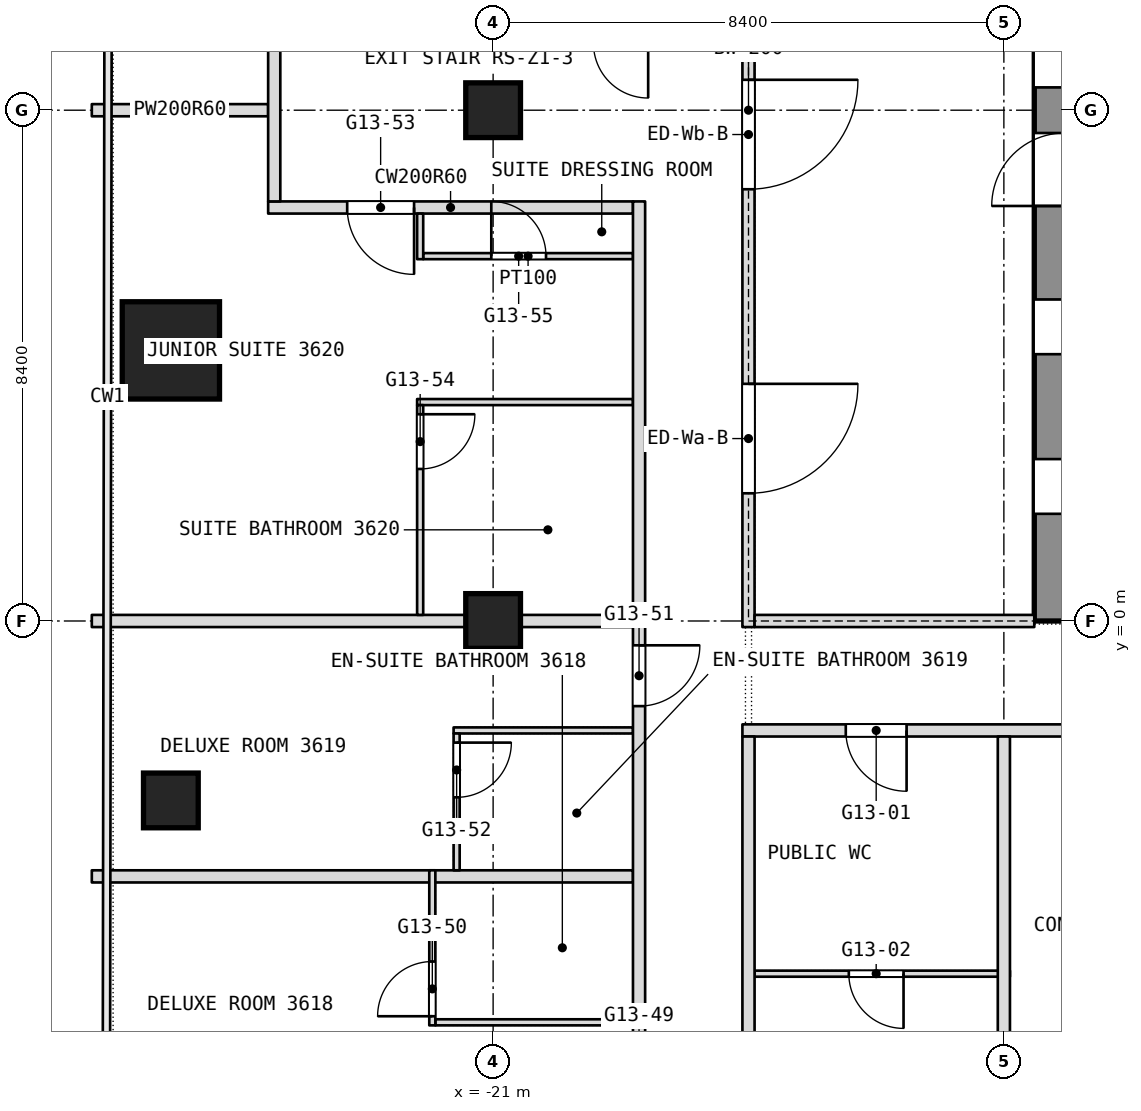
"""IFC4 building model, lengths in metres.
Left out: names, types, materials, properties, quantities, classifications, styles, units other than length and angle.
Written with IfcOpenShell. Run it as: python <this file> out.ifc"""

import sys

from ifc_helpers import new_model, si_unit, direction, frame, frame_2d, origin, origin_2d, place, context, subcontext, project, spatial, rectangle, extrude, element, fill, save


model = new_model("IFC4")
c1 = context("Model", 3, precision=1e-05, world=origin(), true_north=direction((0.0, 1.0)))
c2 = subcontext(c1, "Body", "Model", "MODEL_VIEW")
j1 = project(units=[si_unit("LENGTHUNIT", "METRE"), si_unit("PLANEANGLEUNIT", "RADIAN")], contexts=[c1])
p1 = place(None, origin())
s1 = spatial("IfcSite", under=j1, at=p1, CompositionType="ELEMENT")
p2 = place(p1, origin())
s2 = spatial("IfcBuilding", under=s1, at=p2, CompositionType="ELEMENT")
p3 = place(p2, frame((0.0, 0.0, 155.3)))
s3 = spatial("IfcBuildingStorey", under=s2, at=p3, CompositionType="ELEMENT", Elevation=155.3)
p4 = place(p3, frame((-11.6, 0.0, 0.0), z_axis=(0.0, 0.0, 1.0), x_axis=(0.0, 1.0, 0.0)))
e1 = element("IfcWall", 1, at=p4, inside=s3, PredefinedType="SHEAR", context=c2, shape_type="SweptSolid", body=[
    extrude(rectangle(XDim=16.8, YDim=1.0, at=frame_2d((8.4, 0.0))), origin(), (0.0, 0.0, 1.0), 3.6),
])
p5 = place(p4, frame((1.762, 0.0, 0.0)))
e2 = element("IfcOpeningElement", 2, at=p5, cuts=e1, PredefinedType="OPENING", context=c2, shape_type="SweptSolid", body=[
    extrude(rectangle(XDim=0.9, YDim=2.1, at=frame_2d((0.45, 1.05))), frame((0.0, 0.5, 0.0), z_axis=(0.0, -1.0, 0.0), x_axis=(1.0, 0.0, 0.0)), (0.0, 0.0, 1.0), 1.0),
])
p6 = place(p4, frame((4.387, 0.0, 0.0)))
e3 = element("IfcOpeningElement", 3, at=p6, cuts=e1, PredefinedType="OPENING", context=c2, shape_type="SweptSolid", body=[
    extrude(rectangle(XDim=0.9, YDim=2.1, at=frame_2d((0.45, 1.05))), frame((0.0, 0.5, 0.0), z_axis=(0.0, -1.0, 0.0), x_axis=(1.0, 0.0, 0.0)), (0.0, 0.0, 1.0), 1.0),
])
p7 = place(p4, frame((6.825, 0.0, 0.0)))
e4 = element("IfcOpeningElement", 4, at=p7, cuts=e1, PredefinedType="OPENING", context=c2, shape_type="SweptSolid", body=[
    extrude(rectangle(XDim=1.2, YDim=2.1, at=frame_2d((0.6, 1.05))), frame((0.0, 0.5, 0.0), z_axis=(0.0, -1.0, 0.0), x_axis=(1.0, 0.0, 0.0)), (0.0, 0.0, 1.0), 1.0),
])
p8 = place(p4, frame((12.3, 0.0, 0.0)))
e5 = element("IfcOpeningElement", 5, at=p8, cuts=e1, PredefinedType="OPENING", context=c2, shape_type="SweptSolid", body=[
    extrude(rectangle(XDim=0.9, YDim=2.1, at=frame_2d((0.45, 1.05))), frame((0.0, 0.5, 0.0), z_axis=(0.0, -1.0, 0.0), x_axis=(1.0, 0.0, 0.0)), (0.0, 0.0, 1.0), 1.0),
])
p9 = place(p4, frame((8.775, 0.0, 0.0)))
e6 = element("IfcOpeningElement", 6, at=p9, cuts=e1, PredefinedType="OPENING", context=c2, shape_type="SweptSolid", body=[
    extrude(rectangle(XDim=1.2, YDim=2.1, at=frame_2d((0.6, 1.05))), frame((0.0, 0.5, 0.0), z_axis=(0.0, -1.0, 0.0), x_axis=(1.0, 0.0, 0.0)), (0.0, 0.0, 1.0), 1.0),
])
p10 = place(p3, frame((-26.3, 4.45, 0.0), z_axis=(0.0, 0.0, 1.0), x_axis=(1.0, 0.0, 0.0)))
e7 = element("IfcColumn", 7, at=p10, inside=s3, PredefinedType="COLUMN", context=c2, shape_type="SweptSolid", body=[
    extrude(rectangle(XDim=1.6, YDim=1.6, at=origin_2d()), origin(), (0.0, 0.0, 1.0), 3.6),
])
for number, where, z_axis, x_axis in (
    (8, (-21.0, 0.0, 0.0), (0.0, 0.0, 1.0), (1.0, 0.0, 0.0)),
    (9, (-21.0, 8.4, 0.0), (0.0, 0.0, 1.0), (1.0, 0.0, 0.0)),
    (10, (-26.3, -2.951, 0.0), (0.0, 0.0, 1.0), (1.0, 0.0, 0.0)),
):
    element("IfcColumn", number, at=place(p3, frame(where, z_axis=z_axis, x_axis=x_axis)), inside=s3, PredefinedType="COLUMN", context=c2, shape_type="SweptSolid", body=[
        extrude(rectangle(XDim=0.9, YDim=0.9, at=origin_2d()), origin(), (0.0, 0.0, 1.0), 3.6),
    ])
p11 = place(p3, frame((-21.95, -6.6, 0.0), z_axis=(0.0, 0.0, 1.0), x_axis=(1.0, 0.0, 0.0)))
e11 = element("IfcWall", 11, at=p11, inside=s3, PredefinedType="PARTITIONING", context=c2, shape_type="SweptSolid", body=[
    extrude(rectangle(XDim=3.25, YDim=0.1, at=frame_2d((1.625, 0.0))), origin(), (0.0, 0.0, 1.0), 3.34),
])
p12 = place(p3, frame((-16.7, -5.8, 0.0), z_axis=(0.0, 0.0, 1.0), x_axis=(1.0, 0.0, 0.0)))
e12 = element("IfcWall", 12, at=p12, inside=s3, PredefinedType="PARTITIONING", context=c2, shape_type="SweptSolid", body=[
    extrude(rectangle(XDim=4.2, YDim=0.1, at=frame_2d((2.1, 0.0))), origin(), (0.0, 0.0, 1.0), 3.34),
])
p13 = place(p12, frame((1.55, 0.0, 0.0)))
e13 = element("IfcOpeningElement", 13, at=p13, cuts=e12, PredefinedType="OPENING", context=c2, shape_type="SweptSolid", body=[
    extrude(rectangle(XDim=0.9, YDim=2.1, at=frame_2d((0.45, 1.05))), frame((0.0, 0.05, 0.0), z_axis=(0.0, -1.0, 0.0), x_axis=(1.0, 0.0, 0.0)), (0.0, 0.0, 1.0), 0.1),
])
p14 = place(p3, frame((-27.6, -4.2, 0.0), z_axis=(0.0, 0.0, 1.0), x_axis=(1.0, 0.0, 0.0)))
e14 = element("IfcWall", 14, at=p14, inside=s3, PredefinedType="PARTITIONING", context=c2, shape_type="SweptSolid", body=[
    extrude(rectangle(XDim=8.9, YDim=0.2, at=frame_2d((4.45, 0.0))), origin(), (0.0, 0.0, 1.0), 3.34),
])
p15 = place(p3, frame((-21.65, -1.8, 0.0), z_axis=(0.0, 0.0, 1.0), x_axis=(1.0, 0.0, 0.0)))
e15 = element("IfcWall", 15, at=p15, inside=s3, PredefinedType="PARTITIONING", context=c2, shape_type="SweptSolid", body=[
    extrude(rectangle(XDim=2.95, YDim=0.1, at=frame_2d((1.475, 0.0))), origin(), (0.0, 0.0, 1.0), 3.34),
])
p16 = place(p3, frame((-16.9, -1.8, 0.0), z_axis=(0.0, 0.0, 1.0), x_axis=(1.0, 0.0, 0.0)))
e16 = element("IfcWall", 16, at=p16, inside=s3, PredefinedType="PARTITIONING", context=c2, shape_type="SweptSolid", body=[
    extrude(rectangle(XDim=8.2, YDim=0.2, at=frame_2d((4.1, 0.0))), origin(), (0.0, 0.0, 1.0), 3.34),
])
p17 = place(p16, frame((1.7, 0.0, 0.0)))
e17 = element("IfcOpeningElement", 17, at=p17, cuts=e16, PredefinedType="OPENING", context=c2, shape_type="SweptSolid", body=[
    extrude(rectangle(XDim=1.0, YDim=2.1, at=frame_2d((0.5, 1.05))), frame((0.0, 0.1, 0.0), z_axis=(0.0, -1.0, 0.0), x_axis=(1.0, 0.0, 0.0)), (0.0, 0.0, 1.0), 0.2),
])
p18 = place(p16, frame((5.8, 0.0, 0.0)))
e18 = element("IfcOpeningElement", 18, at=p18, cuts=e16, PredefinedType="OPENING", context=c2, shape_type="SweptSolid", body=[
    extrude(rectangle(XDim=1.0, YDim=2.1, at=frame_2d((0.5, 1.05))), frame((0.0, 0.1, 0.0), z_axis=(0.0, -1.0, 0.0), x_axis=(1.0, 0.0, 0.0)), (0.0, 0.0, 1.0), 0.2),
])
p19 = place(p3, frame((-27.6, 0.0, 0.0), z_axis=(0.0, 0.0, 1.0), x_axis=(1.0, 0.0, 0.0)))
e19 = element("IfcWall", 19, at=p19, inside=s3, PredefinedType="PARTITIONING", context=c2, shape_type="SweptSolid", body=[
    extrude(rectangle(XDim=8.9, YDim=0.2, at=frame_2d((4.45, 0.0))), origin(), (0.0, 0.0, 1.0), 2.89),
])
p20 = place(p3, frame((-22.25, 3.6, 0.0), z_axis=(0.0, 0.0, 1.0), x_axis=(1.0, 0.0, 0.0)))
e20 = element("IfcWall", 20, at=p20, inside=s3, PredefinedType="PARTITIONING", context=c2, shape_type="SweptSolid", body=[
    extrude(rectangle(XDim=3.55, YDim=0.1, at=frame_2d((1.775, 0.0))), origin(), (0.0, 0.0, 1.0), 3.34),
])
p21 = place(p3, frame((-22.15, 6.0, 0.0), z_axis=(0.0, 0.0, 1.0), x_axis=(1.0, 0.0, 0.0)))
e21 = element("IfcWall", 21, at=p21, inside=s3, PredefinedType="PARTITIONING", context=c2, shape_type="SweptSolid", body=[
    extrude(rectangle(XDim=3.45, YDim=0.1, at=frame_2d((1.725, 0.0))), origin(), (0.0, 0.0, 1.0), 3.34),
])
p22 = place(p21, frame((1.12, 0.0, 0.0)))
e22 = element("IfcOpeningElement", 22, at=p22, cuts=e21, PredefinedType="OPENING", context=c2, shape_type="SweptSolid", body=[
    extrude(rectangle(XDim=0.9, YDim=2.1, at=frame_2d((0.45, 1.05))), frame((0.0, 0.05, 0.0), z_axis=(0.0, -1.0, 0.0), x_axis=(1.0, 0.0, 0.0)), (0.0, 0.0, 1.0), 0.1),
])
p23 = place(p3, frame((-24.7, 6.8, 0.0), z_axis=(0.0, 0.0, 1.0), x_axis=(1.0, 0.0, 0.0)))
e23 = element("IfcWall", 23, at=p23, inside=s3, PredefinedType="PARTITIONING", context=c2, shape_type="SweptSolid", body=[
    extrude(rectangle(XDim=6.0, YDim=0.2, at=frame_2d((3.0, 0.0))), origin(), (0.0, 0.0, 1.0), 3.34),
])
p24 = place(p23, frame((1.3, 0.0, 0.0)))
e24 = element("IfcOpeningElement", 24, at=p24, cuts=e23, PredefinedType="OPENING", context=c2, shape_type="SweptSolid", body=[
    extrude(rectangle(XDim=1.1, YDim=2.1, at=frame_2d((0.55, 1.05))), frame((0.0, 0.1, 0.0), z_axis=(0.0, -1.0, 0.0), x_axis=(1.0, 0.0, 0.0)), (0.0, 0.0, 1.0), 0.2),
])
p25 = place(p3, frame((-27.6, 8.4, 0.0), z_axis=(0.0, 0.0, 1.0), x_axis=(1.0, 0.0, 0.0)))
e25 = element("IfcWall", 25, at=p25, inside=s3, PredefinedType="PARTITIONING", context=c2, shape_type="SweptSolid", body=[
    extrude(rectangle(XDim=2.9, YDim=0.2, at=frame_2d((1.45, 0.0))), origin(), (0.0, 0.0, 1.0), 2.89),
])
p26 = place(p3, frame((-12.6, -11.6, 0.0), z_axis=(0.0, 0.0, 1.0), x_axis=(0.0, 1.0, 0.0)))
e26 = element("IfcWall", 26, at=p26, inside=s3, PredefinedType="PARTITIONING", context=c2, shape_type="SweptSolid", body=[
    extrude(rectangle(XDim=9.7, YDim=0.2, at=frame_2d((4.85, 0.0))), origin(), (0.0, 0.0, 1.0), 3.34),
])
p27 = place(p3, frame((-16.8, -11.8, 0.0), z_axis=(0.0, 0.0, 1.0), x_axis=(0.0, 1.0, 0.0)))
e27 = element("IfcWall", 27, at=p27, inside=s3, PredefinedType="PARTITIONING", context=c2, shape_type="SweptSolid", body=[
    extrude(rectangle(XDim=9.9, YDim=0.2, at=frame_2d((4.95, 0.0))), origin(), (0.0, 0.0, 1.0), 3.34),
])
p28 = place(p3, frame((-18.6, -21.708, 0.0), z_axis=(0.0, 0.0, 1.0), x_axis=(0.0, 1.0, 0.0)))
e28 = element("IfcWall", 28, at=p28, inside=s3, PredefinedType="PARTITIONING", context=c2, shape_type="SweptSolid", body=[
    extrude(rectangle(XDim=28.608, YDim=0.2, at=frame_2d((14.304, 0.0))), origin(), (0.0, 0.0, 1.0), 3.34),
])
p29 = place(p28, frame((2.8, 0.0, 0.0)))
e29 = element("IfcOpeningElement", 29, at=p29, cuts=e28, PredefinedType="OPENING", context=c2, shape_type="SweptSolid", body=[
    extrude(rectangle(XDim=1.0, YDim=2.1, at=frame_2d((0.5, 1.05))), frame((0.0, 0.1, 0.0), z_axis=(0.0, -1.0, 0.0), x_axis=(1.0, 0.0, 0.0)), (0.0, 0.0, 1.0), 0.2),
])
p30 = place(p28, frame((7.708, 0.0, 0.0)))
e30 = element("IfcOpeningElement", 30, at=p30, cuts=e28, PredefinedType="OPENING", context=c2, shape_type="SweptSolid", body=[
    extrude(rectangle(XDim=1.0, YDim=2.1, at=frame_2d((0.5, 1.05))), frame((0.0, 0.1, 0.0), z_axis=(0.0, -1.0, 0.0), x_axis=(1.0, 0.0, 0.0)), (0.0, 0.0, 1.0), 0.2),
])
p31 = place(p28, frame((9.508, 0.0, 0.0)))
e31 = element("IfcOpeningElement", 31, at=p31, cuts=e28, PredefinedType="OPENING", context=c2, shape_type="SweptSolid", body=[
    extrude(rectangle(XDim=1.0, YDim=2.1, at=frame_2d((0.5, 1.05))), frame((0.0, 0.1, 0.0), z_axis=(0.0, -1.0, 0.0), x_axis=(1.0, 0.0, 0.0)), (0.0, 0.0, 1.0), 0.2),
])
p32 = place(p28, frame((13.708, 0.0, 0.0)))
e32 = element("IfcOpeningElement", 32, at=p32, cuts=e28, PredefinedType="OPENING", context=c2, shape_type="SweptSolid", body=[
    extrude(rectangle(XDim=1.0, YDim=2.1, at=frame_2d((0.5, 1.05))), frame((0.0, 0.1, 0.0), z_axis=(0.0, -1.0, 0.0), x_axis=(1.0, 0.0, 0.0)), (0.0, 0.0, 1.0), 0.2),
])
p33 = place(p28, frame((20.308, 0.0, 0.0)))
e33 = element("IfcOpeningElement", 33, at=p33, cuts=e28, PredefinedType="OPENING", context=c2, shape_type="SweptSolid", body=[
    extrude(rectangle(XDim=1.0, YDim=2.1, at=frame_2d((0.5, 1.05))), frame((0.0, 0.1, 0.0), z_axis=(0.0, -1.0, 0.0), x_axis=(1.0, 0.0, 0.0)), (0.0, 0.0, 1.0), 0.2),
])
p34 = place(p3, frame((-21.6, -4.1, 0.0), z_axis=(0.0, 0.0, 1.0), x_axis=(0.0, 1.0, 0.0)))
e34 = element("IfcWall", 34, at=p34, inside=s3, PredefinedType="PARTITIONING", context=c2, shape_type="SweptSolid", body=[
    extrude(rectangle(XDim=2.25, YDim=0.1, at=frame_2d((1.125, 0.0))), origin(), (0.0, 0.0, 1.0), 3.34),
])
p35 = place(p34, frame((1.2, 0.0, 0.0)))
e35 = element("IfcOpeningElement", 35, at=p35, cuts=e34, PredefinedType="OPENING", context=c2, shape_type="SweptSolid", body=[
    extrude(rectangle(XDim=0.9, YDim=2.1, at=frame_2d((0.45, 1.05))), frame((0.0, 0.05, 0.0), z_axis=(0.0, -1.0, 0.0), x_axis=(1.0, 0.0, 0.0)), (0.0, 0.0, 1.0), 0.1),
])
p36 = place(p3, frame((-22.0, -6.65, 0.0), z_axis=(0.0, 0.0, 1.0), x_axis=(0.0, 1.0, 0.0)))
e36 = element("IfcWall", 36, at=p36, inside=s3, PredefinedType="PARTITIONING", context=c2, shape_type="SweptSolid", body=[
    extrude(rectangle(XDim=2.55, YDim=0.1, at=frame_2d((1.275, 0.0))), origin(), (0.0, 0.0, 1.0), 3.34),
])
p37 = place(p36, frame((0.15, 0.0, 0.0)))
e37 = element("IfcOpeningElement", 37, at=p37, cuts=e36, PredefinedType="OPENING", context=c2, shape_type="SweptSolid", body=[
    extrude(rectangle(XDim=0.9, YDim=2.1, at=frame_2d((0.45, 1.05))), frame((0.0, 0.05, 0.0), z_axis=(0.0, -1.0, 0.0), x_axis=(1.0, 0.0, 0.0)), (0.0, 0.0, 1.0), 0.1),
])
p38 = place(p3, frame((-22.2, 0.1, 0.0), z_axis=(0.0, 0.0, 1.0), x_axis=(0.0, 1.0, 0.0)))
e38 = element("IfcWall", 38, at=p38, inside=s3, PredefinedType="PARTITIONING", context=c2, shape_type="SweptSolid", body=[
    extrude(rectangle(XDim=3.45, YDim=0.1, at=frame_2d((1.725, 0.0))), origin(), (0.0, 0.0, 1.0), 3.34),
])
p39 = place(p38, frame((2.4, 0.0, 0.0)))
e39 = element("IfcOpeningElement", 39, at=p39, cuts=e38, PredefinedType="OPENING", context=c2, shape_type="SweptSolid", body=[
    extrude(rectangle(XDim=0.9, YDim=2.1, at=frame_2d((0.45, 1.05))), frame((0.0, 0.05, 0.0), z_axis=(0.0, -1.0, 0.0), x_axis=(1.0, 0.0, 0.0)), (0.0, 0.0, 1.0), 0.1),
])
p40 = place(p3, frame((-22.2, 5.95, 0.0), z_axis=(0.0, 0.0, 1.0), x_axis=(0.0, 1.0, 0.0)))
e40 = element("IfcWall", 40, at=p40, inside=s3, PredefinedType="PARTITIONING", context=c2, shape_type="SweptSolid", body=[
    extrude(rectangle(XDim=0.75, YDim=0.1, at=frame_2d((0.375, 0.0))), origin(), (0.0, 0.0, 1.0), 3.34),
])
p41 = place(p3, frame((-24.6, 6.9, 0.0), z_axis=(0.0, 0.0, 1.0), x_axis=(0.0, 1.0, 0.0)))
e41 = element("IfcWall", 41, at=p41, inside=s3, PredefinedType="PARTITIONING", context=c2, shape_type="SweptSolid", body=[
    extrude(rectangle(XDim=11.6, YDim=0.2, at=frame_2d((5.8, 0.0))), origin(), (0.0, 0.0, 1.0), 3.34),
])
p42 = place(p41, frame((5.45, 0.0, 0.0)))
e42 = element("IfcOpeningElement", 42, at=p42, cuts=e41, PredefinedType="OPENING", context=c2, shape_type="SweptSolid", body=[
    extrude(rectangle(XDim=1.8, YDim=2.1, at=frame_2d((0.9, 1.05))), frame((0.0, 0.1, 0.0), z_axis=(0.0, -1.0, 0.0), x_axis=(1.0, 0.0, 0.0)), (0.0, 0.0, 1.0), 0.2),
])
p43 = place(p3, frame((-16.8, -0.1, 0.0), z_axis=(0.0, 0.0, 1.0), x_axis=(0.0, 1.0, 0.0)))
e43 = element("IfcWall", 43, at=p43, inside=s3, PredefinedType="PARTITIONING", context=c2, shape_type="SweptSolid", body=[
    extrude(rectangle(XDim=17.0, YDim=0.2, at=frame_2d((8.5, 0.0))), origin(), (0.0, 0.0, 1.0), 3.34),
])
p44 = place(p43, frame((2.2, 0.0, 0.0)))
e44 = element("IfcOpeningElement", 44, at=p44, cuts=e43, PredefinedType="OPENING", context=c2, shape_type="SweptSolid", body=[
    extrude(rectangle(XDim=1.8, YDim=2.1, at=frame_2d((0.9, 1.05))), frame((0.0, 0.1, 0.0), z_axis=(0.0, -1.0, 0.0), x_axis=(1.0, 0.0, 0.0)), (0.0, 0.0, 1.0), 0.2),
])
p45 = place(p43, frame((7.2, 0.0, 0.0)))
e45 = element("IfcOpeningElement", 45, at=p45, cuts=e43, PredefinedType="OPENING", context=c2, shape_type="SweptSolid", body=[
    extrude(rectangle(XDim=1.8, YDim=2.1, at=frame_2d((0.9, 1.05))), frame((0.0, 0.1, 0.0), z_axis=(0.0, -1.0, 0.0), x_axis=(1.0, 0.0, 0.0)), (0.0, 0.0, 1.0), 0.2),
])
p46 = place(p3, frame((-16.7, 0.0, 0.0), z_axis=(0.0, 0.0, 1.0), x_axis=(1.0, 0.0, 0.0)))
e46 = element("IfcWall", 46, at=p46, inside=s3, PredefinedType="PARTITIONING", context=c2, shape_type="SweptSolid", body=[
    extrude(rectangle(XDim=4.6, YDim=0.2, at=frame_2d((2.3, 0.0))), origin(), (0.0, 0.0, 1.0), 2.89),
])
p47 = place(p13, origin())
e47 = element("IfcDoor", 47, at=p47, inside=s3, OperationType="SINGLE_SWING_RIGHT", PredefinedType="DOOR", context=c2, shape_type="SweptSolid", body=[
    extrude(rectangle(XDim=0.9, YDim=2.1, at=frame_2d((0.45, 1.05))), frame((0.0, 0.025, 0.0), z_axis=(0.0, -1.0, 0.0), x_axis=(1.0, 0.0, 0.0)), (0.0, 0.0, 1.0), 0.05),
])
fill(e13, e47)
p48 = place(p17, origin())
e48 = element("IfcDoor", 48, at=p48, inside=s3, OperationType="SINGLE_SWING_LEFT", PredefinedType="DOOR", context=c2, shape_type="SweptSolid", body=[
    extrude(rectangle(XDim=1.0, YDim=2.1, at=frame_2d((0.5, 1.05))), frame((0.0, 0.025, 0.0), z_axis=(0.0, -1.0, 0.0), x_axis=(1.0, 0.0, 0.0)), (0.0, 0.0, 1.0), 0.05),
])
fill(e17, e48)
p49 = place(p22, origin())
e49 = element("IfcDoor", 49, at=p49, inside=s3, OperationType="SINGLE_SWING_RIGHT", PredefinedType="DOOR", context=c2, shape_type="SweptSolid", body=[
    extrude(rectangle(XDim=0.9, YDim=2.1, at=frame_2d((0.45, 1.05))), frame((0.0, 0.025, 0.0), z_axis=(0.0, -1.0, 0.0), x_axis=(1.0, 0.0, 0.0)), (0.0, 0.0, 1.0), 0.05),
])
fill(e22, e49)
p50 = place(p24, origin())
e50 = element("IfcDoor", 50, at=p50, inside=s3, OperationType="SINGLE_SWING_LEFT", PredefinedType="DOOR", context=c2, shape_type="SweptSolid", body=[
    extrude(rectangle(XDim=1.1, YDim=2.1, at=frame_2d((0.55, 1.05))), frame((0.0, 0.025, 0.0), z_axis=(0.0, -1.0, 0.0), x_axis=(1.0, 0.0, 0.0)), (0.0, 0.0, 1.0), 0.05),
])
fill(e24, e50)
p51 = place(p33, origin())
e51 = element("IfcDoor", 51, at=p51, inside=s3, OperationType="SINGLE_SWING_RIGHT", PredefinedType="DOOR", context=c2, shape_type="SweptSolid", body=[
    extrude(rectangle(XDim=1.0, YDim=2.1, at=frame_2d((0.5, 1.05))), frame((0.0, 0.025, 0.0), z_axis=(0.0, -1.0, 0.0), x_axis=(1.0, 0.0, 0.0)), (0.0, 0.0, 1.0), 0.05),
])
fill(e33, e51)
p52 = place(p35, origin())
e52 = element("IfcDoor", 52, at=p52, inside=s3, OperationType="SINGLE_SWING_LEFT", PredefinedType="DOOR", context=c2, shape_type="SweptSolid", body=[
    extrude(rectangle(XDim=0.9, YDim=2.1, at=frame_2d((0.45, 1.05))), frame((0.0, 0.025, 0.0), z_axis=(0.0, -1.0, 0.0), x_axis=(1.0, 0.0, 0.0)), (0.0, 0.0, 1.0), 0.05),
])
fill(e35, e52)
p53 = place(p37, origin())
e53 = element("IfcDoor", 53, at=p53, inside=s3, OperationType="SINGLE_SWING_RIGHT", PredefinedType="DOOR", context=c2, shape_type="SweptSolid", body=[
    extrude(rectangle(XDim=0.9, YDim=2.1, at=frame_2d((0.45, 1.05))), frame((0.0, 0.025, 0.0), z_axis=(0.0, -1.0, 0.0), x_axis=(1.0, 0.0, 0.0)), (0.0, 0.0, 1.0), 0.05),
])
fill(e37, e53)
p54 = place(p39, origin())
e54 = element("IfcDoor", 54, at=p54, inside=s3, OperationType="SINGLE_SWING_LEFT", PredefinedType="DOOR", context=c2, shape_type="SweptSolid", body=[
    extrude(rectangle(XDim=0.9, YDim=2.1, at=frame_2d((0.45, 1.05))), frame((0.0, 0.025, 0.0), z_axis=(0.0, -1.0, 0.0), x_axis=(1.0, 0.0, 0.0)), (0.0, 0.0, 1.0), 0.05),
])
fill(e39, e54)
p55 = place(p44, origin())
e55 = element("IfcDoor", 55, at=p55, inside=s3, OperationType="DOUBLE_DOOR_SINGLE_SWING", PredefinedType="DOOR", context=c2, shape_type="SweptSolid", body=[
    extrude(rectangle(XDim=1.8, YDim=2.1, at=frame_2d((0.9, 1.05))), frame((0.0, 0.025, 0.0), z_axis=(0.0, -1.0, 0.0), x_axis=(1.0, 0.0, 0.0)), (0.0, 0.0, 1.0), 0.05),
])
fill(e44, e55)
p56 = place(p45, origin())
e56 = element("IfcDoor", 56, at=p56, inside=s3, OperationType="DOUBLE_DOOR_SINGLE_SWING", PredefinedType="DOOR", context=c2, shape_type="SweptSolid", body=[
    extrude(rectangle(XDim=1.8, YDim=2.1, at=frame_2d((0.9, 1.05))), frame((0.0, 0.025, 0.0), z_axis=(0.0, -1.0, 0.0), x_axis=(1.0, 0.0, 0.0)), (0.0, 0.0, 1.0), 0.05),
])
fill(e45, e56)
save(model, sys.argv[1])
